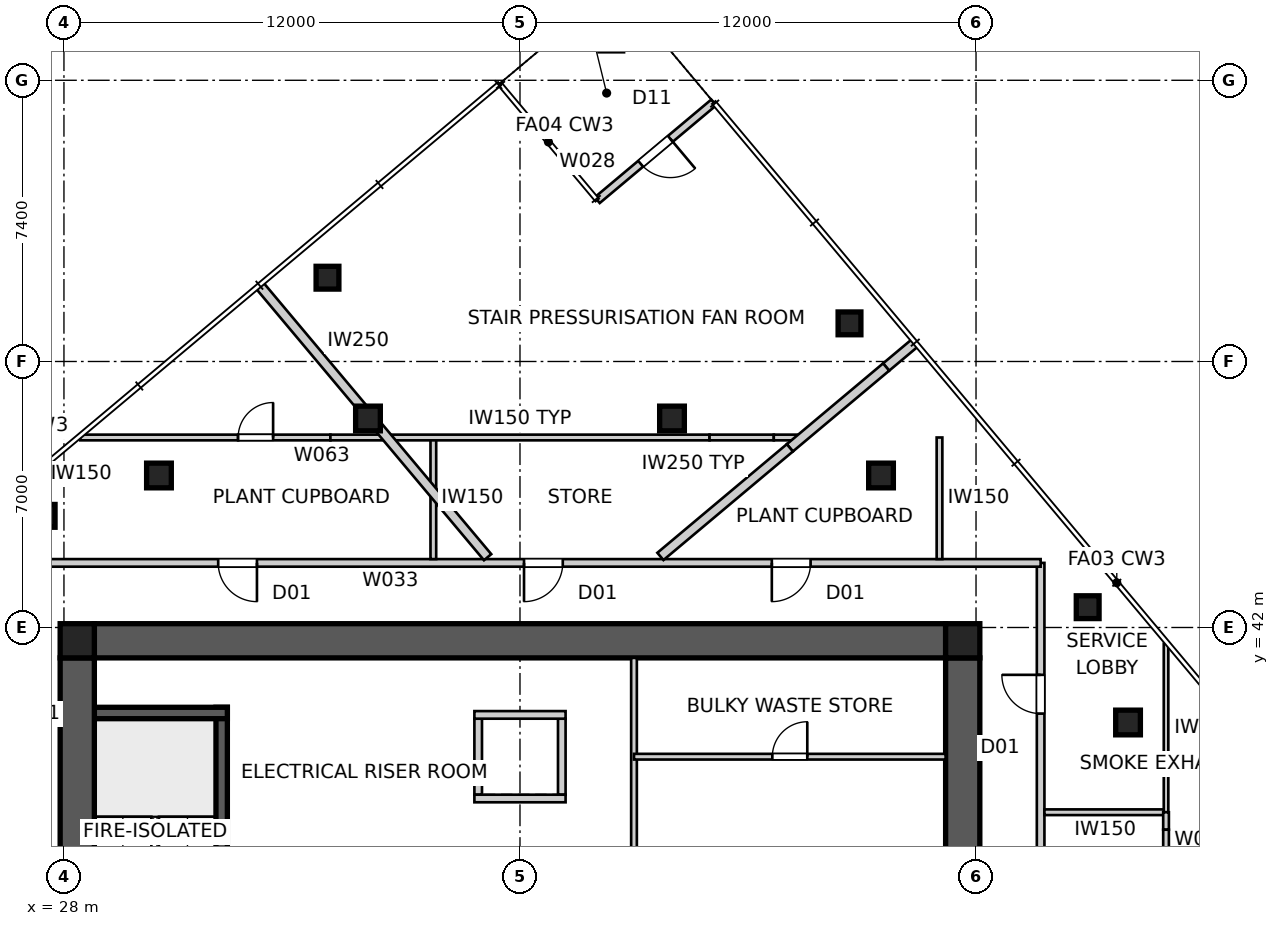
"""IFC4 building model, lengths in metres.
Left out: names, types, materials, properties, quantities, classifications, styles, units other than length and angle.
Written with IfcOpenShell. Run it as: python <this file> out.ifc"""

import sys

from ifc_helpers import new_model, si_unit, direction, frame, frame_2d, origin, origin_2d, place, context, subcontext, project, spatial, polyline, rectangle, outline, extrude, element, fill, save


model = new_model("IFC4")
c1 = context("Model", 3, precision=1e-05, world=origin(), true_north=direction((0.0, 1.0)))
c2 = subcontext(c1, "Body", "Model", "MODEL_VIEW")
j1 = project(units=[si_unit("LENGTHUNIT", "METRE"), si_unit("PLANEANGLEUNIT", "RADIAN")], contexts=[c1])
p1 = place(None, origin())
s1 = spatial("IfcSite", under=j1, at=p1, CompositionType="ELEMENT")
p2 = place(p1, origin())
s2 = spatial("IfcBuilding", under=s1, at=p2, CompositionType="ELEMENT")
p3 = place(p2, frame((0.0, 0.0, 304.3)))
s3 = spatial("IfcBuildingStorey", under=s2, at=p3, CompositionType="ELEMENT", Elevation=304.3)
p4 = place(p3, frame((28.8, 41.65, 0.0), z_axis=(0.0, 0.0, 1.0), x_axis=(1.0, 0.0, 0.0)))
e1 = element("IfcWall", 1, at=p4, inside=s3, PredefinedType="SHEAR", context=c2, shape_type="SweptSolid", body=[
    extrude(outline(polyline([(0.0, -0.45), (22.4, -0.45), (22.4, -0.025), (22.85, -0.025), (22.85, 0.025), (22.4, 0.025), (22.4, 0.45), (0.0, 0.45), (0.0, 0.025), (-0.45, 0.025), (-0.45, -0.025), (0.0, -0.025), (0.0, -0.45)])), origin(), (0.0, 0.0, 1.0), 4.5),
])
p5 = place(p3, frame((51.65, 18.8, 0.0), z_axis=(0.0, 0.0, 1.0), x_axis=(0.0, 1.0, 0.0)))
e2 = element("IfcWall", 2, at=p5, inside=s3, PredefinedType="SHEAR", context=c2, shape_type="SweptSolid", body=[
    extrude(outline(polyline([(0.0, -0.45), (22.4, -0.45), (22.4, -0.025), (22.85, -0.025), (22.85, 0.025), (22.4, 0.025), (22.4, 0.45), (0.0, 0.45), (0.0, 0.025), (-0.45, 0.025), (-0.45, -0.025), (0.0, -0.025), (0.0, -0.45)])), origin(), (0.0, 0.0, 1.0), 4.5),
])
p6 = place(p5, frame((11.14, 0.0, 0.0)))
e3 = element("IfcOpeningElement", 3, at=p6, cuts=e2, PredefinedType="OPENING", context=c2, shape_type="SweptSolid", body=[
    extrude(rectangle(XDim=1.02, YDim=2.4, at=frame_2d((0.51, 1.2))), frame((0.0, 0.46, 0.0), z_axis=(0.0, -1.0, 0.0), x_axis=(1.0, 0.0, 0.0)), (0.0, 0.0, 1.0), 0.92),
])
p7 = place(p3, frame((28.35, 41.2, 0.0), z_axis=(0.0, 0.0, 1.0), x_axis=(0.0, -1.0, 0.0)))
e4 = element("IfcWall", 4, at=p7, inside=s3, PredefinedType="SHEAR", context=c2, shape_type="SweptSolid", body=[
    extrude(outline(polyline([(0.0, -0.45), (22.4, -0.45), (22.4, -0.025), (22.85, -0.025), (22.85, 0.025), (22.4, 0.025), (22.4, 0.45), (0.0, 0.45), (0.0, 0.025), (-0.45, 0.025), (-0.45, -0.025), (0.0, -0.025), (0.0, -0.45)])), origin(), (0.0, 0.0, 1.0), 4.5),
])
p8 = place(p7, frame((11.14, 0.0, 0.0)))
e5 = element("IfcOpeningElement", 5, at=p8, cuts=e4, PredefinedType="OPENING", context=c2, shape_type="SweptSolid", body=[
    extrude(rectangle(XDim=1.02, YDim=2.4, at=frame_2d((0.51, 1.2))), frame((0.0, 0.46, 0.0), z_axis=(0.0, -1.0, 0.0), x_axis=(1.0, 0.0, 0.0)), (0.0, 0.0, 1.0), 0.92),
])
p9 = place(p3, frame((32.15, 32.2, 0.0), z_axis=(0.0, 0.0, 1.0), x_axis=(0.0, 1.0, 0.0)))
e6 = element("IfcWall", 6, at=p9, inside=s3, PredefinedType="SHEAR", context=c2, shape_type="SweptSolid", body=[
    extrude(rectangle(XDim=7.7, YDim=0.3, at=frame_2d((3.85, 0.0))), origin(), (0.0, 0.0, 1.0), 4.5),
])
p10 = place(p3, frame((28.8, 39.75, 0.0), z_axis=(0.0, 0.0, 1.0), x_axis=(1.0, 0.0, 0.0)))
e7 = element("IfcWall", 7, at=p10, inside=s3, PredefinedType="SHEAR", context=c2, shape_type="SweptSolid", body=[
    extrude(rectangle(XDim=3.5, YDim=0.3, at=frame_2d((1.75, 0.0))), origin(), (0.0, 0.0, 1.0), 4.5),
])
for number, where, z_axis, x_axis in (
    (8, (38.9, 37.6, 0.0), (0.0, 0.0, 1.0), (0.0, 1.0, 0.0)),
    (9, (41.1, 37.6, 0.0), (0.0, 0.0, 1.0), (0.0, 1.0, 0.0)),
):
    element("IfcWall", number, at=place(p3, frame(where, z_axis=z_axis, x_axis=x_axis)), inside=s3, PredefinedType="SOLIDWALL", context=c2, shape_type="SweptSolid", body=[
        extrude(rectangle(XDim=2.0, YDim=0.2, at=frame_2d((1.0, 0.0))), origin(), (0.0, 0.0, 1.0), 4.5),
    ])
for number, where, z_axis, x_axis in (
    (10, (38.8, 37.5, 0.0), (0.0, 0.0, 1.0), (1.0, 0.0, 0.0)),
    (11, (38.8, 39.7, 0.0), (0.0, 0.0, 1.0), (1.0, 0.0, 0.0)),
):
    element("IfcWall", number, at=place(p3, frame(where, z_axis=z_axis, x_axis=x_axis)), inside=s3, PredefinedType="SOLIDWALL", context=c2, shape_type="SweptSolid", body=[
        extrude(rectangle(XDim=2.4, YDim=0.2, at=frame_2d((1.2, 0.0))), origin(), (0.0, 0.0, 1.0), 4.5),
    ])
for number, where, z_axis, x_axis in (
    (12, (51.65, 41.65, 0.0), (0.0, 0.0, 1.0), (1.0, 0.0, 0.0)),
    (13, (28.35, 41.65, 0.0), (0.0, 0.0, 1.0), (1.0, 0.0, 0.0)),
):
    element("IfcColumn", number, at=place(p3, frame(where, z_axis=z_axis, x_axis=x_axis)), inside=s3, PredefinedType="COLUMN", context=c2, shape_type="SweptSolid", body=[
        extrude(rectangle(XDim=0.9, YDim=0.9, at=origin_2d()), origin(), (0.0, 0.0, 1.0), 4.5),
    ])
for number, where, z_axis, x_axis in (
    (14, (54.938, 42.534, 0.0), (0.0, 0.0, 1.0), (1.0, 0.0, 0.0)),
    (15, (48.671, 50.003, 0.0), (0.0, 0.0, 1.0), (1.0, 0.0, 0.0)),
    (16, (34.935, 51.205, 0.0), (0.0, 0.0, 1.0), (1.0, 0.0, 0.0)),
    (17, (27.466, 44.938, 0.0), (0.0, 0.0, 1.0), (1.0, 0.0, 0.0)),
):
    element("IfcColumn", number, at=place(p3, frame(where, z_axis=z_axis, x_axis=x_axis)), inside=s3, PredefinedType="COLUMN", context=c2, shape_type="SweptSolid", body=[
        extrude(rectangle(XDim=0.6, YDim=0.6, at=origin_2d()), origin(), (0.0, 0.0, 1.0), 4.5),
    ])
for number, where, z_axis, x_axis in (
    (18, (56.0, 39.5, 0.0), (0.0, 0.0, 1.0), (1.0, 0.0, 0.0)),
    (19, (49.5, 46.0, 0.0), (0.0, 0.0, 1.0), (1.0, 0.0, 0.0)),
    (20, (44.0, 47.5, 0.0), (0.0, 0.0, 1.0), (1.0, 0.0, 0.0)),
    (21, (36.0, 47.5, 0.0), (0.0, 0.0, 1.0), (1.0, 0.0, 0.0)),
    (22, (30.5, 46.0, 0.0), (0.0, 0.0, 1.0), (1.0, 0.0, 0.0)),
):
    element("IfcColumn", number, at=place(p3, frame(where, z_axis=z_axis, x_axis=x_axis)), inside=s3, PredefinedType="COLUMN", context=c2, shape_type="SweptSolid", body=[
        extrude(rectangle(XDim=0.65, YDim=0.65, at=origin_2d()), origin(), (0.0, 0.0, 1.0), 4.5),
    ])
p11 = place(p3, frame((45.098, 55.817, 0.0), z_axis=(0.0, 0.0, 1.0), x_axis=(-0.766060656284, -0.642768287094, 0.0)))
e23 = element("IfcWall", 23, at=p11, inside=s3, PredefinedType="SOLIDWALL", context=c2, shape_type="SweptSolid", body=[
    extrude(rectangle(XDim=4.0, YDim=0.2, at=frame_2d((2.0, 0.0))), origin(), (0.0, 0.0, 1.0), 4.25),
])
p12 = place(p11, frame((1.49, 0.0, 0.0)))
e24 = element("IfcOpeningElement", 24, at=p12, cuts=e23, PredefinedType="OPENING", context=c2, shape_type="SweptSolid", body=[
    extrude(rectangle(XDim=1.02, YDim=2.1, at=frame_2d((0.51, 1.05))), frame((0.0, 0.11, 0.0), z_axis=(0.0, -1.0, 0.0), x_axis=(1.0, 0.0, 0.0)), (0.0, 0.0, 1.0), 0.22),
])
p13 = place(p3, frame((53.7, 16.3, 0.0), z_axis=(0.0, 0.0, 1.0), x_axis=(0.0, 1.0, 0.0)))
e25 = element("IfcWall", 25, at=p13, inside=s3, PredefinedType="PARTITIONING", context=c2, shape_type="SweptSolid", body=[
    extrude(rectangle(XDim=27.4, YDim=0.2, at=frame_2d((13.7, 0.0))), origin(), (0.0, 0.0, 1.0), 4.25),
])
p14 = place(p13, frame((10.146, 0.0, 0.0)))
e26 = element("IfcOpeningElement", 26, at=p14, cuts=e25, PredefinedType="OPENING", context=c2, shape_type="SweptSolid", body=[
    extrude(rectangle(XDim=1.02, YDim=2.34, at=frame_2d((0.51, 1.17))), frame((0.0, 0.11, 0.0), z_axis=(0.0, -1.0, 0.0), x_axis=(1.0, 0.0, 0.0)), (0.0, 0.0, 1.0), 0.22),
])
p15 = place(p13, frame((17.042, 0.0, 0.0)))
e27 = element("IfcOpeningElement", 27, at=p15, cuts=e25, PredefinedType="OPENING", context=c2, shape_type="SweptSolid", body=[
    extrude(rectangle(XDim=1.02, YDim=2.34, at=frame_2d((0.51, 1.17))), frame((0.0, 0.11, 0.0), z_axis=(0.0, -1.0, 0.0), x_axis=(1.0, 0.0, 0.0)), (0.0, 0.0, 1.0), 0.22),
])
p16 = place(p13, frame((23.434, 0.0, 0.0)))
e28 = element("IfcOpeningElement", 28, at=p16, cuts=e25, PredefinedType="OPENING", context=c2, shape_type="SweptSolid", body=[
    extrude(rectangle(XDim=1.02, YDim=2.34, at=frame_2d((0.51, 1.17))), frame((0.0, 0.11, 0.0), z_axis=(0.0, -1.0, 0.0), x_axis=(1.0, 0.0, 0.0)), (0.0, 0.0, 1.0), 0.22),
])
p17 = place(p3, frame((53.7, 43.7, 0.0), z_axis=(0.0, 0.0, 1.0), x_axis=(-1.0, 0.0, 0.0)))
e29 = element("IfcWall", 29, at=p17, inside=s3, PredefinedType="PARTITIONING", context=c2, shape_type="SweptSolid", body=[
    extrude(rectangle(XDim=27.4, YDim=0.2, at=frame_2d((13.7, 0.0))), origin(), (0.0, 0.0, 1.0), 4.25),
])
p18 = place(p17, frame((20.621, 0.0, 0.0)))
e30 = element("IfcOpeningElement", 30, at=p18, cuts=e29, PredefinedType="OPENING", context=c2, shape_type="SweptSolid", body=[
    extrude(rectangle(XDim=1.02, YDim=2.34, at=frame_2d((0.51, 1.17))), frame((0.0, 0.11, 0.0), z_axis=(0.0, -1.0, 0.0), x_axis=(1.0, 0.0, 0.0)), (0.0, 0.0, 1.0), 0.22),
])
p19 = place(p17, frame((6.053, 0.0, 0.0)))
e31 = element("IfcOpeningElement", 31, at=p19, cuts=e29, PredefinedType="OPENING", context=c2, shape_type="SweptSolid", body=[
    extrude(rectangle(XDim=1.02, YDim=2.34, at=frame_2d((0.51, 1.17))), frame((0.0, 0.11, 0.0), z_axis=(0.0, -1.0, 0.0), x_axis=(1.0, 0.0, 0.0)), (0.0, 0.0, 1.0), 0.22),
])
p20 = place(p17, frame((12.574, 0.0, 0.0)))
e32 = element("IfcOpeningElement", 32, at=p20, cuts=e29, PredefinedType="OPENING", context=c2, shape_type="SweptSolid", body=[
    extrude(rectangle(XDim=1.02, YDim=2.34, at=frame_2d((0.51, 1.17))), frame((0.0, 0.11, 0.0), z_axis=(0.0, -1.0, 0.0), x_axis=(1.0, 0.0, 0.0)), (0.0, 0.0, 1.0), 0.22),
])
p21 = place(p3, frame((61.007, 36.857, 0.0), z_axis=(0.0, 0.0, 1.0), x_axis=(-0.766045019392, -0.64278692291, 0.0)))
e33 = element("IfcWall", 33, at=p21, inside=s3, PredefinedType="PARTITIONING", context=c2, shape_type="SweptSolid", body=[
    extrude(rectangle(XDim=9.343, YDim=0.25, at=frame_2d((4.671, 0.0))), origin(), (0.0, 0.0, 1.0), 4.25),
])
p22 = place(p3, frame((50.401, 49.497, 0.0), z_axis=(0.0, 0.0, 1.0), x_axis=(-0.766055819685, -0.64277405138, 0.0)))
e34 = element("IfcWall", 34, at=p22, inside=s3, PredefinedType="PARTITIONING", context=c2, shape_type="SweptSolid", body=[
    extrude(rectangle(XDim=1.0, YDim=0.25, at=frame_2d((0.5, 0.0))), origin(), (0.0, 0.0, 1.0), 4.25),
])
p23 = place(p3, frame((49.635, 48.854, 0.0), z_axis=(0.0, 0.0, 1.0), x_axis=(-0.766014492995, -0.642823301165, 0.0)))
e35 = element("IfcWall", 35, at=p23, inside=s3, PredefinedType="PARTITIONING", context=c2, shape_type="SweptSolid", body=[
    extrude(rectangle(XDim=3.308, YDim=0.25, at=frame_2d((1.654, 0.0))), origin(), (0.0, 0.0, 1.0), 3.638),
])
p24 = place(p3, frame((47.101, 46.728, 0.0), z_axis=(0.0, 0.0, 1.0), x_axis=(-0.766051985436, -0.642778620996, 0.0)))
e36 = element("IfcWall", 36, at=p24, inside=s3, PredefinedType="PARTITIONING", context=c2, shape_type="SweptSolid", body=[
    extrude(rectangle(XDim=4.446, YDim=0.25, at=frame_2d((2.223, 0.0))), origin(), (0.0, 0.0, 1.0), 4.25),
])
p25 = place(p3, frame((33.143, 51.007, 0.0), z_axis=(0.0, 0.0, 1.0), x_axis=(0.64278692291, -0.766045019392, 0.0)))
e37 = element("IfcWall", 37, at=p25, inside=s3, PredefinedType="PARTITIONING", context=c2, shape_type="SweptSolid", body=[
    extrude(rectangle(XDim=9.343, YDim=0.25, at=frame_2d((4.671, 0.0))), origin(), (0.0, 0.0, 1.0), 4.25),
])
p26 = place(p3, frame((43.0, 41.2, 0.0), z_axis=(0.0, 0.0, 1.0), x_axis=(0.0, -1.0, 0.0)))
e38 = element("IfcWall", 38, at=p26, inside=s3, PredefinedType="SOLIDWALL", context=c2, shape_type="SweptSolid", body=[
    extrude(rectangle(XDim=5.9, YDim=0.15, at=frame_2d((2.95, 0.0))), origin(), (0.0, 0.0, 1.0), 4.25),
])
p27 = place(p3, frame((43.0, 38.6, 0.0), z_axis=(0.0, 0.0, 1.0), x_axis=(1.0, 0.0, 0.0)))
e39 = element("IfcWall", 39, at=p27, inside=s3, PredefinedType="SOLIDWALL", context=c2, shape_type="SweptSolid", body=[
    extrude(rectangle(XDim=8.2, YDim=0.15, at=frame_2d((4.1, 0.0))), origin(), (0.0, 0.0, 1.0), 4.25),
])
p28 = place(p27, frame((3.64, 0.0, 0.0)))
e40 = element("IfcOpeningElement", 40, at=p28, cuts=e39, PredefinedType="OPENING", context=c2, shape_type="SweptSolid", body=[
    extrude(rectangle(XDim=0.92, YDim=2.1, at=frame_2d((0.46, 1.05))), frame((0.0, 0.085, 0.0), z_axis=(0.0, -1.0, 0.0), x_axis=(1.0, 0.0, 0.0)), (0.0, 0.0, 1.0), 0.17),
])
for number, where, z_axis, x_axis in (
    (41, (51.039, 43.8, 0.0), (0.0, 0.0, 1.0), (0.0, 1.0, 0.0)),
    (42, (57.0, 37.138, 0.0), (0.0, 0.0, 1.0), (-1.0, 0.0, 0.0)),
):
    element("IfcWall", number, at=place(p3, frame(where, z_axis=z_axis, x_axis=x_axis)), inside=s3, PredefinedType="SOLIDWALL", context=c2, shape_type="SweptSolid", body=[
        extrude(rectangle(XDim=3.2, YDim=0.15, at=frame_2d((1.6, 0.0))), origin(), (0.0, 0.0, 1.0), 4.25),
    ])
p29 = place(p3, frame((57.0, 41.57, 0.0), z_axis=(0.0, 0.0, 1.0), x_axis=(0.0, -1.0, 0.0)))
e43 = element("IfcWall", 43, at=p29, inside=s3, PredefinedType="PARTITIONING", context=c2, shape_type="SweptSolid", body=[
    extrude(rectangle(XDim=4.432, YDim=0.12, at=frame_2d((2.216, 0.0))), origin(), (0.0, 0.0, 1.0), 4.25),
])
p30 = place(p3, frame((57.0, 37.138, 0.0), z_axis=(0.0, 0.0, 1.0), x_axis=(0.0, -1.0, 0.0)))
e44 = element("IfcWall", 44, at=p30, inside=s3, PredefinedType="SOLIDWALL", context=c2, shape_type="SweptSolid", body=[
    extrude(rectangle(XDim=0.46, YDim=0.15, at=frame_2d((0.23, 0.0))), origin(), (0.0, 0.0, 1.0), 4.25),
])
p31 = place(p3, frame((57.0, 36.678, 0.0), z_axis=(0.0, 0.0, 1.0), x_axis=(0.0, -1.0, 0.0)))
e45 = element("IfcWall", 45, at=p31, inside=s3, PredefinedType="SOLIDWALL", context=c2, shape_type="SweptSolid", body=[
    extrude(rectangle(XDim=1.822, YDim=0.15, at=frame_2d((0.911, 0.0))), origin(), (0.0, 0.0, 1.0), 3.25),
])
p32 = place(p31, frame((0.902, 0.0, 0.0)))
e46 = element("IfcOpeningElement", 46, at=p32, cuts=e45, PredefinedType="OPENING", context=c2, shape_type="SweptSolid", body=[
    extrude(rectangle(XDim=0.92, YDim=2.1, at=frame_2d((0.46, 1.05))), frame((0.0, 0.085, 0.0), z_axis=(0.0, -1.0, 0.0), x_axis=(1.0, 0.0, 0.0)), (0.0, 0.0, 1.0), 0.17),
])
p33 = place(p3, frame((37.72, 47.0, 0.0), z_axis=(0.0, 0.0, 1.0), x_axis=(0.0, -1.0, 0.0)))
e47 = element("IfcWall", 47, at=p33, inside=s3, PredefinedType="SOLIDWALL", context=c2, shape_type="SweptSolid", body=[
    extrude(rectangle(XDim=3.2, YDim=0.15, at=frame_2d((1.6, 0.0))), origin(), (0.0, 0.0, 1.0), 4.25),
])
p34 = place(p3, frame((28.43, 47.0, 0.0), z_axis=(0.0, 0.0, 1.0), x_axis=(1.0, 0.0, 0.0)))
e48 = element("IfcWall", 48, at=p34, inside=s3, PredefinedType="SOLIDWALL", context=c2, shape_type="SweptSolid", body=[
    extrude(rectangle(XDim=4.154, YDim=0.15, at=frame_2d((2.077, 0.0))), origin(), (0.0, 0.0, 1.0), 4.25),
])
p35 = place(p3, frame((32.584, 47.0, 0.0), z_axis=(0.0, 0.0, 1.0), x_axis=(1.0, 0.0, 0.0)))
e49 = element("IfcWall", 49, at=p35, inside=s3, PredefinedType="SOLIDWALL", context=c2, shape_type="SweptSolid", body=[
    extrude(rectangle(XDim=2.428, YDim=0.15, at=frame_2d((1.214, 0.0))), origin(), (0.0, 0.0, 1.0), 3.25),
])
p36 = place(p35, origin())
e50 = element("IfcOpeningElement", 50, at=p36, cuts=e49, PredefinedType="OPENING", context=c2, shape_type="SweptSolid", body=[
    extrude(rectangle(XDim=0.92, YDim=2.1, at=frame_2d((0.46, 1.05))), frame((0.0, 0.085, 0.0), z_axis=(0.0, -1.0, 0.0), x_axis=(1.0, 0.0, 0.0)), (0.0, 0.0, 1.0), 0.17),
])
p37 = place(p3, frame((35.012, 47.0, 0.0), z_axis=(0.0, 0.0, 1.0), x_axis=(1.0, 0.0, 0.0)))
e51 = element("IfcWall", 51, at=p37, inside=s3, PredefinedType="SOLIDWALL", context=c2, shape_type="SweptSolid", body=[
    extrude(rectangle(XDim=9.977, YDim=0.15, at=frame_2d((4.988, 0.0))), origin(), (0.0, 0.0, 1.0), 4.25),
])
p38 = place(p3, frame((44.988, 47.0, 0.0), z_axis=(0.0, 0.0, 1.0), x_axis=(1.0, 0.0, 0.0)))
e52 = element("IfcWall", 52, at=p38, inside=s3, PredefinedType="SOLIDWALL", context=c2, shape_type="SweptSolid", body=[
    extrude(rectangle(XDim=1.69, YDim=0.15, at=frame_2d((0.845, 0.0))), origin(), (0.0, 0.0, 1.0), 3.25),
])
p39 = place(p3, frame((46.678, 47.0, 0.0), z_axis=(0.0, 0.0, 1.0), x_axis=(1.0, 0.0, 0.0)))
e53 = element("IfcWall", 53, at=p39, inside=s3, PredefinedType="SOLIDWALL", context=c2, shape_type="SweptSolid", body=[
    extrude(rectangle(XDim=0.747, YDim=0.15, at=frame_2d((0.373, 0.0))), origin(), (0.0, 0.0, 1.0), 4.25),
])
p40 = place(p12, origin())
e54 = element("IfcDoor", 54, at=p40, inside=s3, OperationType="SINGLE_SWING_LEFT", PredefinedType="DOOR", context=c2, shape_type="SweptSolid", body=[
    extrude(rectangle(XDim=1.02, YDim=2.1, at=frame_2d((0.51, 1.05))), frame((0.0, 0.025, 0.0), z_axis=(0.0, -1.0, 0.0), x_axis=(1.0, 0.0, 0.0)), (0.0, 0.0, 1.0), 0.05),
])
fill(e24, e54)
p41 = place(p2, frame((0.0, 0.0, 308.8)))
p42 = place(p41, frame((0.0, 0.0, -0.25)))
p43 = place(p42, frame((50.5, 38.999, 0.0)))
p44 = place(p43, frame((0.0, 0.0, 0.2)))
e55 = element("IfcWindow", 55, at=p44, inside=s3, PartitioningType="SINGLE_PANEL", PredefinedType="SKYLIGHT", context=c2, shape_type="SweptSolid", body=[
    extrude(rectangle(XDim=1.2, YDim=1.2, at=origin_2d()), origin(), (0.0, 0.0, 1.0), 0.05),
])
p45 = place(p18, origin())
e56 = element("IfcDoor", 56, at=p45, inside=s3, OperationType="SINGLE_SWING_LEFT", PredefinedType="DOOR", context=c2, shape_type="SweptSolid", body=[
    extrude(rectangle(XDim=1.02, YDim=2.34, at=frame_2d((0.51, 1.17))), frame((0.0, 0.025, 0.0), z_axis=(0.0, -1.0, 0.0), x_axis=(1.0, 0.0, 0.0)), (0.0, 0.0, 1.0), 0.05),
])
fill(e30, e56)
p46 = place(p19, origin())
e57 = element("IfcDoor", 57, at=p46, inside=s3, OperationType="SINGLE_SWING_RIGHT", PredefinedType="DOOR", context=c2, shape_type="SweptSolid", body=[
    extrude(rectangle(XDim=1.02, YDim=2.34, at=frame_2d((0.51, 1.17))), frame((0.0, 0.025, 0.0), z_axis=(0.0, -1.0, 0.0), x_axis=(1.0, 0.0, 0.0)), (0.0, 0.0, 1.0), 0.05),
])
fill(e31, e57)
p47 = place(p16, origin())
e58 = element("IfcDoor", 58, at=p47, inside=s3, OperationType="SINGLE_SWING_RIGHT", PredefinedType="DOOR", context=c2, shape_type="SweptSolid", body=[
    extrude(rectangle(XDim=1.02, YDim=2.34, at=frame_2d((0.51, 1.17))), frame((0.0, 0.025, 0.0), z_axis=(0.0, -1.0, 0.0), x_axis=(1.0, 0.0, 0.0)), (0.0, 0.0, 1.0), 0.05),
])
fill(e28, e58)
p48 = place(p20, origin())
e59 = element("IfcDoor", 59, at=p48, inside=s3, OperationType="SINGLE_SWING_RIGHT", PredefinedType="DOOR", context=c2, shape_type="SweptSolid", body=[
    extrude(rectangle(XDim=1.02, YDim=2.34, at=frame_2d((0.51, 1.17))), frame((0.0, 0.025, 0.0), z_axis=(0.0, -1.0, 0.0), x_axis=(1.0, 0.0, 0.0)), (0.0, 0.0, 1.0), 0.05),
])
fill(e32, e59)
p49 = place(p28, origin())
e60 = element("IfcDoor", 60, at=p49, inside=s3, OperationType="SINGLE_SWING_RIGHT", PredefinedType="DOOR", context=c2, shape_type="SweptSolid", body=[
    extrude(rectangle(XDim=0.92, YDim=2.1, at=frame_2d((0.46, 1.05))), frame((0.0, 0.025, 0.0), z_axis=(0.0, -1.0, 0.0), x_axis=(1.0, 0.0, 0.0)), (0.0, 0.0, 1.0), 0.05),
])
fill(e40, e60)
p50 = place(p36, origin())
e61 = element("IfcDoor", 61, at=p50, inside=s3, OperationType="SINGLE_SWING_RIGHT", PredefinedType="DOOR", context=c2, shape_type="SweptSolid", body=[
    extrude(rectangle(XDim=0.92, YDim=2.1, at=frame_2d((0.46, 1.05))), frame((0.0, 0.025, 0.0), z_axis=(0.0, -1.0, 0.0), x_axis=(1.0, 0.0, 0.0)), (0.0, 0.0, 1.0), 0.05),
])
fill(e50, e61)
save(model, sys.argv[1])
